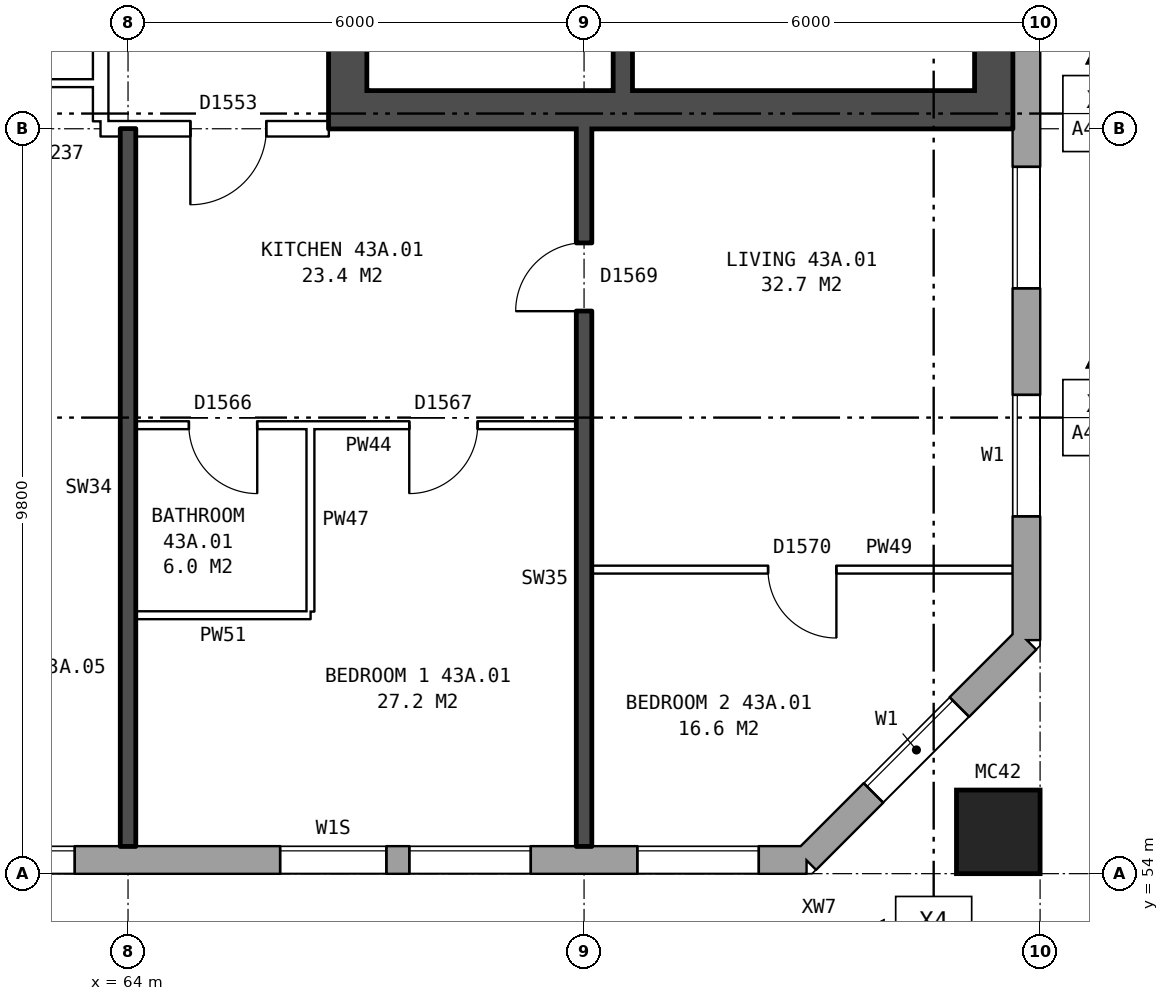
"""IFC4 building model, lengths in metres.
Left out: names, types, materials, properties, quantities, classifications, styles, units other than length and angle.
Written with IfcOpenShell. Run it as: python <this file> out.ifc"""

import sys

from ifc_helpers import new_model, si_unit, direction, frame, frame_2d, origin, origin_2d, place, context, subcontext, project, spatial, rectangle, hollow_rectangle, extrude, element, fill, save


model = new_model("IFC4")
c1 = context("Model", 3, precision=1e-05, world=origin(), true_north=direction((0.0, 1.0)))
c2 = subcontext(c1, "Body", "Model", "MODEL_VIEW")
j1 = project(units=[si_unit("LENGTHUNIT", "METRE"), si_unit("PLANEANGLEUNIT", "RADIAN")], contexts=[c1])
p1 = place(None, origin())
s1 = spatial("IfcSite", under=j1, at=p1, CompositionType="ELEMENT")
p2 = place(p1, origin())
s2 = spatial("IfcBuilding", under=s1, at=p2, CompositionType="ELEMENT")
p3 = place(p2, frame((0.0, 0.0, 154.7)))
s3 = spatial("IfcBuildingStorey", under=s2, at=p3, CompositionType="ELEMENT", Elevation=154.7)
p4 = place(p3, frame((75.45, 54.55, 0.0), z_axis=(0.0, 0.0, 1.0), x_axis=(1.0, 0.0, 0.0)))
e1 = element("IfcColumn", 1, at=p4, inside=s3, PredefinedType="COLUMN", context=c2, shape_type="SweptSolid", body=[
    extrude(hollow_rectangle(XDim=1.1, YDim=1.1, WallThickness=0.06, at=origin_2d()), origin(), (0.0, 0.0, 1.0), 3.1),
])
p5 = place(p3, frame((31.575, 54.18, 0.0), z_axis=(0.0, 0.0, 1.0), x_axis=(1.0, 0.0, 0.0)))
e2 = element("IfcWall", 2, at=p5, inside=s3, PredefinedType="STANDARD", context=c2, shape_type="SweptSolid", body=[
    extrude(rectangle(XDim=41.351, YDim=0.36, at=frame_2d((20.675, 0.0))), origin(), (0.0, 0.0, 1.0), 2.85),
])
p6 = place(p5, frame((3.125, 0.0, 0.8)))
e3 = element("IfcOpeningElement", 3, at=p6, cuts=e2, PredefinedType="OPENING", context=c2, shape_type="SweptSolid", body=[
    extrude(rectangle(XDim=1.6, YDim=1.8, at=frame_2d((0.8, 0.9))), frame((0.0, 0.19, 0.0), z_axis=(0.0, -1.0, 0.0), x_axis=(1.0, 0.0, 0.0)), (0.0, 0.0, 1.0), 0.38),
])
p7 = place(p5, frame((5.025, 0.0, 1.0)))
e4 = element("IfcOpeningElement", 4, at=p7, cuts=e2, PredefinedType="OPENING", context=c2, shape_type="SweptSolid", body=[
    extrude(rectangle(XDim=1.0, YDim=1.5, at=frame_2d((0.5, 0.75))), frame((0.0, 0.19, 0.0), z_axis=(0.0, -1.0, 0.0), x_axis=(1.0, 0.0, 0.0)), (0.0, 0.0, 1.0), 0.38),
])
p8 = place(p5, frame((9.125, 0.0, 0.8)))
e5 = element("IfcOpeningElement", 5, at=p8, cuts=e2, PredefinedType="OPENING", context=c2, shape_type="SweptSolid", body=[
    extrude(rectangle(XDim=1.6, YDim=1.8, at=frame_2d((0.8, 0.9))), frame((0.0, 0.19, 0.0), z_axis=(0.0, -1.0, 0.0), x_axis=(1.0, 0.0, 0.0)), (0.0, 0.0, 1.0), 0.38),
])
p9 = place(p5, frame((12.125, 0.0, 0.8)))
e6 = element("IfcOpeningElement", 6, at=p9, cuts=e2, PredefinedType="OPENING", context=c2, shape_type="SweptSolid", body=[
    extrude(rectangle(XDim=1.6, YDim=1.8, at=frame_2d((0.8, 0.9))), frame((0.0, 0.19, 0.0), z_axis=(0.0, -1.0, 0.0), x_axis=(1.0, 0.0, 0.0)), (0.0, 0.0, 1.0), 0.38),
])
p10 = place(p5, frame((15.125, 0.0, 0.8)))
e7 = element("IfcOpeningElement", 7, at=p10, cuts=e2, PredefinedType="OPENING", context=c2, shape_type="SweptSolid", body=[
    extrude(rectangle(XDim=1.6, YDim=1.8, at=frame_2d((0.8, 0.9))), frame((0.0, 0.19, 0.0), z_axis=(0.0, -1.0, 0.0), x_axis=(1.0, 0.0, 0.0)), (0.0, 0.0, 1.0), 0.38),
])
p11 = place(p5, frame((18.125, 0.0, 0.8)))
e8 = element("IfcOpeningElement", 8, at=p11, cuts=e2, PredefinedType="OPENING", context=c2, shape_type="SweptSolid", body=[
    extrude(rectangle(XDim=1.6, YDim=1.8, at=frame_2d((0.8, 0.9))), frame((0.0, 0.19, 0.0), z_axis=(0.0, -1.0, 0.0), x_axis=(1.0, 0.0, 0.0)), (0.0, 0.0, 1.0), 0.38),
])
p12 = place(p5, frame((21.125, 0.0, 0.8)))
e9 = element("IfcOpeningElement", 9, at=p12, cuts=e2, PredefinedType="OPENING", context=c2, shape_type="SweptSolid", body=[
    extrude(rectangle(XDim=1.6, YDim=1.8, at=frame_2d((0.8, 0.9))), frame((0.0, 0.19, 0.0), z_axis=(0.0, -1.0, 0.0), x_axis=(1.0, 0.0, 0.0)), (0.0, 0.0, 1.0), 0.38),
])
p13 = place(p5, frame((24.125, 0.0, 0.8)))
e10 = element("IfcOpeningElement", 10, at=p13, cuts=e2, PredefinedType="OPENING", context=c2, shape_type="SweptSolid", body=[
    extrude(rectangle(XDim=1.6, YDim=1.8, at=frame_2d((0.8, 0.9))), frame((0.0, 0.19, 0.0), z_axis=(0.0, -1.0, 0.0), x_axis=(1.0, 0.0, 0.0)), (0.0, 0.0, 1.0), 0.38),
])
p14 = place(p5, frame((27.125, 0.0, 0.8)))
e11 = element("IfcOpeningElement", 11, at=p14, cuts=e2, PredefinedType="OPENING", context=c2, shape_type="SweptSolid", body=[
    extrude(rectangle(XDim=1.6, YDim=1.8, at=frame_2d((0.8, 0.9))), frame((0.0, 0.19, 0.0), z_axis=(0.0, -1.0, 0.0), x_axis=(1.0, 0.0, 0.0)), (0.0, 0.0, 1.0), 0.38),
])
p15 = place(p5, frame((30.125, 0.0, 0.8)))
e12 = element("IfcOpeningElement", 12, at=p15, cuts=e2, PredefinedType="OPENING", context=c2, shape_type="SweptSolid", body=[
    extrude(rectangle(XDim=1.6, YDim=1.8, at=frame_2d((0.8, 0.9))), frame((0.0, 0.19, 0.0), z_axis=(0.0, -1.0, 0.0), x_axis=(1.0, 0.0, 0.0)), (0.0, 0.0, 1.0), 0.38),
])
p16 = place(p5, frame((34.425, 0.0, 1.7)))
e13 = element("IfcOpeningElement", 13, at=p16, cuts=e2, PredefinedType="OPENING", context=c2, shape_type="SweptSolid", body=[
    extrude(rectangle(XDim=1.4, YDim=0.9, at=frame_2d((0.7, 0.45))), frame((0.0, 0.19, 0.0), z_axis=(0.0, -1.0, 0.0), x_axis=(1.0, 0.0, 0.0)), (0.0, 0.0, 1.0), 0.38),
])
p17 = place(p5, frame((36.125, 0.0, 0.8)))
e14 = element("IfcOpeningElement", 14, at=p17, cuts=e2, PredefinedType="OPENING", context=c2, shape_type="SweptSolid", body=[
    extrude(rectangle(XDim=1.6, YDim=1.8, at=frame_2d((0.8, 0.9))), frame((0.0, 0.19, 0.0), z_axis=(0.0, -1.0, 0.0), x_axis=(1.0, 0.0, 0.0)), (0.0, 0.0, 1.0), 0.38),
])
p18 = place(p5, frame((39.125, 0.0, 0.8)))
e15 = element("IfcOpeningElement", 15, at=p18, cuts=e2, PredefinedType="OPENING", context=c2, shape_type="SweptSolid", body=[
    extrude(rectangle(XDim=1.6, YDim=1.8, at=frame_2d((0.8, 0.9))), frame((0.0, 0.19, 0.0), z_axis=(0.0, -1.0, 0.0), x_axis=(1.0, 0.0, 0.0)), (0.0, 0.0, 1.0), 0.38),
])
p19 = place(p5, frame((6.325, 0.0, 1.7)))
e16 = element("IfcOpeningElement", 16, at=p19, cuts=e2, PredefinedType="OPENING", context=c2, shape_type="SweptSolid", body=[
    extrude(rectangle(XDim=0.6, YDim=0.9, at=frame_2d((0.3, 0.45))), frame((0.0, 0.19, 0.0), z_axis=(0.0, -1.0, 0.0), x_axis=(1.0, 0.0, 0.0)), (0.0, 0.0, 1.0), 0.38),
])
p20 = place(p3, frame((72.925, 54.18, 0.0), z_axis=(0.0, 0.0, 1.0), x_axis=(0.707106781187, 0.707106781187, 0.0)))
e17 = element("IfcWall", 17, at=p20, inside=s3, PredefinedType="STANDARD", context=c2, shape_type="SweptSolid", body=[
    extrude(rectangle(XDim=4.094, YDim=0.36, at=frame_2d((2.047, 0.0))), origin(), (0.0, 0.0, 1.0), 2.85),
])
p21 = place(p20, frame((1.247, 0.0, 0.8)))
e18 = element("IfcOpeningElement", 18, at=p21, cuts=e17, PredefinedType="OPENING", context=c2, shape_type="SweptSolid", body=[
    extrude(rectangle(XDim=1.6, YDim=1.8, at=frame_2d((0.8, 0.9))), frame((0.0, 0.19, 0.0), z_axis=(0.0, -1.0, 0.0), x_axis=(1.0, 0.0, 0.0)), (0.0, 0.0, 1.0), 0.38),
])
p22 = place(p3, frame((75.82, 57.075, 0.0), z_axis=(0.0, 0.0, 1.0), x_axis=(0.0, 1.0, 0.0)))
e19 = element("IfcWall", 19, at=p22, inside=s3, PredefinedType="STANDARD", context=c2, shape_type="SweptSolid", body=[
    extrude(rectangle(XDim=25.851, YDim=0.36, at=frame_2d((12.925, 0.0))), origin(), (0.0, 0.0, 1.0), 2.85),
])
p23 = place(p22, frame((1.625, 0.0, 0.8)))
e20 = element("IfcOpeningElement", 20, at=p23, cuts=e19, PredefinedType="OPENING", context=c2, shape_type="SweptSolid", body=[
    extrude(rectangle(XDim=1.6, YDim=1.8, at=frame_2d((0.8, 0.9))), frame((0.0, 0.19, 0.0), z_axis=(0.0, -1.0, 0.0), x_axis=(1.0, 0.0, 0.0)), (0.0, 0.0, 1.0), 0.38),
])
p24 = place(p22, frame((4.625, 0.0, 0.8)))
e21 = element("IfcOpeningElement", 21, at=p24, cuts=e19, PredefinedType="OPENING", context=c2, shape_type="SweptSolid", body=[
    extrude(rectangle(XDim=1.6, YDim=1.8, at=frame_2d((0.8, 0.9))), frame((0.0, 0.19, 0.0), z_axis=(0.0, -1.0, 0.0), x_axis=(1.0, 0.0, 0.0)), (0.0, 0.0, 1.0), 0.38),
])
p25 = place(p22, frame((19.625, 0.0, 0.8)))
e22 = element("IfcOpeningElement", 22, at=p25, cuts=e19, PredefinedType="OPENING", context=c2, shape_type="SweptSolid", body=[
    extrude(rectangle(XDim=1.6, YDim=1.8, at=frame_2d((0.8, 0.9))), frame((0.0, 0.19, 0.0), z_axis=(0.0, -1.0, 0.0), x_axis=(1.0, 0.0, 0.0)), (0.0, 0.0, 1.0), 0.38),
])
p26 = place(p22, frame((22.625, 0.0, 0.8)))
e23 = element("IfcOpeningElement", 23, at=p26, cuts=e19, PredefinedType="OPENING", context=c2, shape_type="SweptSolid", body=[
    extrude(rectangle(XDim=1.6, YDim=1.8, at=frame_2d((0.8, 0.9))), frame((0.0, 0.19, 0.0), z_axis=(0.0, -1.0, 0.0), x_axis=(1.0, 0.0, 0.0)), (0.0, 0.0, 1.0), 0.38),
])
p27 = place(p3, frame((66.89, 63.8, 0.0), z_axis=(0.0, 0.0, 1.0), x_axis=(0.0, 1.0, 0.0)))
e24 = element("IfcWall", 24, at=p27, inside=s3, PredefinedType="SHEAR", context=c2, shape_type="SweptSolid", body=[
    extrude(rectangle(XDim=12.4, YDim=0.5, at=frame_2d((6.2, 0.0))), origin(), (0.0, 0.0, 1.0), 2.85),
])
p28 = place(p27, frame((1.325, 0.0, 0.0)))
e25 = element("IfcOpeningElement", 25, at=p28, cuts=e24, PredefinedType="OPENING", context=c2, shape_type="SweptSolid", body=[
    extrude(rectangle(XDim=1.1, YDim=2.1, at=frame_2d((0.55, 1.05))), frame((0.0, 0.26, 0.0), z_axis=(0.0, -1.0, 0.0), x_axis=(1.0, 0.0, 0.0)), (0.0, 0.0, 1.0), 0.52),
])
p29 = place(p27, frame((3.6, 0.0, 0.0)))
e26 = element("IfcOpeningElement", 26, at=p29, cuts=e24, PredefinedType="OPENING", context=c2, shape_type="SweptSolid", body=[
    extrude(rectangle(XDim=1.1, YDim=2.1, at=frame_2d((0.55, 1.05))), frame((0.0, 0.26, 0.0), z_axis=(0.0, -1.0, 0.0), x_axis=(1.0, 0.0, 0.0)), (0.0, 0.0, 1.0), 0.52),
])
p30 = place(p27, frame((5.8, 0.0, 0.0)))
e27 = element("IfcOpeningElement", 27, at=p30, cuts=e24, PredefinedType="OPENING", context=c2, shape_type="SweptSolid", body=[
    extrude(rectangle(XDim=1.1, YDim=2.1, at=frame_2d((0.55, 1.05))), frame((0.0, 0.26, 0.0), z_axis=(0.0, -1.0, 0.0), x_axis=(1.0, 0.0, 0.0)), (0.0, 0.0, 1.0), 0.52),
])
p31 = place(p27, frame((8.0, 0.0, 0.0)))
e28 = element("IfcOpeningElement", 28, at=p31, cuts=e24, PredefinedType="OPENING", context=c2, shape_type="SweptSolid", body=[
    extrude(rectangle(XDim=1.1, YDim=2.1, at=frame_2d((0.55, 1.05))), frame((0.0, 0.26, 0.0), z_axis=(0.0, -1.0, 0.0), x_axis=(1.0, 0.0, 0.0)), (0.0, 0.0, 1.0), 0.52),
])
p32 = place(p27, frame((9.9, 0.0, 0.0)))
e29 = element("IfcOpeningElement", 29, at=p32, cuts=e24, PredefinedType="OPENING", context=c2, shape_type="SweptSolid", body=[
    extrude(rectangle(XDim=1.1, YDim=2.1, at=frame_2d((0.55, 1.05))), frame((0.0, 0.26, 0.0), z_axis=(0.0, -1.0, 0.0), x_axis=(1.0, 0.0, 0.0)), (0.0, 0.0, 1.0), 0.52),
])
p33 = place(p3, frame((75.39, 63.8, 0.0), z_axis=(0.0, 0.0, 1.0), x_axis=(0.0, 1.0, 0.0)))
e30 = element("IfcWall", 30, at=p33, inside=s3, PredefinedType="SHEAR", context=c2, shape_type="SweptSolid", body=[
    extrude(rectangle(XDim=12.4, YDim=0.5, at=frame_2d((6.2, 0.0))), origin(), (0.0, 0.0, 1.0), 2.85),
])
p34 = place(p3, frame((67.14, 64.05, 0.0), z_axis=(0.0, 0.0, 1.0), x_axis=(1.0, 0.0, 0.0)))
e31 = element("IfcWall", 31, at=p34, inside=s3, PredefinedType="SHEAR", context=c2, shape_type="SweptSolid", body=[
    extrude(rectangle(XDim=8.0, YDim=0.5, at=frame_2d((4.0, 0.0))), origin(), (0.0, 0.0, 1.0), 2.85),
])
p35 = place(p3, frame((70.51, 64.3, 0.0), z_axis=(0.0, 0.0, 1.0), x_axis=(0.0, 1.0, 0.0)))
e32 = element("IfcWall", 32, at=p35, inside=s3, PredefinedType="SHEAR", context=c2, shape_type="SweptSolid", body=[
    extrude(rectangle(XDim=2.425, YDim=0.25, at=frame_2d((1.212, 0.0))), origin(), (0.0, 0.0, 1.0), 2.85),
])
p36 = place(p3, frame((63.64, 63.9, 0.0), z_axis=(0.0, 0.0, 1.0), x_axis=(0.0, 1.0, 0.0)))
e33 = element("IfcWall", 33, at=p36, inside=s3, PredefinedType="PARTITIONING", context=c2, shape_type="SweptSolid", body=[
    extrude(rectangle(XDim=12.2, YDim=0.2, at=frame_2d((6.1, 0.0))), origin(), (0.0, 0.0, 1.0), 2.85),
])
p37 = place(p36, frame((5.1, 0.0, 0.0)))
e34 = element("IfcOpeningElement", 34, at=p37, cuts=e33, PredefinedType="OPENING", context=c2, shape_type="SweptSolid", body=[
    extrude(rectangle(XDim=2.0, YDim=2.1, at=frame_2d((1.0, 1.05))), frame((0.0, 0.11, 0.0), z_axis=(0.0, -1.0, 0.0), x_axis=(1.0, 0.0, 0.0)), (0.0, 0.0, 1.0), 0.22),
])
p38 = place(p3, frame((64.1, 57.4, 0.0), z_axis=(0.0, 0.0, 1.0), x_axis=(1.0, 0.0, 0.0)))
e35 = element("IfcWall", 35, at=p38, inside=s3, PredefinedType="PARTITIONING", context=c2, shape_type="SweptSolid", body=[
    extrude(rectangle(XDim=2.3, YDim=0.1, at=frame_2d((1.15, 0.0))), origin(), (0.0, 0.0, 1.0), 2.85),
])
p39 = place(p3, frame((70.1, 58.0, 0.0), z_axis=(0.0, 0.0, 1.0), x_axis=(1.0, 0.0, 0.0)))
e36 = element("IfcWall", 36, at=p39, inside=s3, PredefinedType="PARTITIONING", context=c2, shape_type="SweptSolid", body=[
    extrude(rectangle(XDim=5.54, YDim=0.1, at=frame_2d((2.77, 0.0))), origin(), (0.0, 0.0, 1.0), 2.85),
])
p40 = place(p39, frame((2.32, 0.0, 0.0)))
e37 = element("IfcOpeningElement", 37, at=p40, cuts=e36, PredefinedType="OPENING", context=c2, shape_type="SweptSolid", body=[
    extrude(rectangle(XDim=0.9, YDim=2.1, at=frame_2d((0.45, 1.05))), frame((0.0, 0.06, 0.0), z_axis=(0.0, -1.0, 0.0), x_axis=(1.0, 0.0, 0.0)), (0.0, 0.0, 1.0), 0.12),
])
p41 = place(p3, frame((64.1, 59.9, 0.0), z_axis=(0.0, 0.0, 1.0), x_axis=(1.0, 0.0, 0.0)))
e38 = element("IfcWall", 38, at=p41, inside=s3, PredefinedType="PARTITIONING", context=c2, shape_type="SweptSolid", body=[
    extrude(rectangle(XDim=5.8, YDim=0.1, at=frame_2d((2.9, 0.0))), origin(), (0.0, 0.0, 1.0), 2.85),
])
p42 = place(p41, frame((3.6, 0.0, 0.0)))
e39 = element("IfcOpeningElement", 39, at=p42, cuts=e38, PredefinedType="OPENING", context=c2, shape_type="SweptSolid", body=[
    extrude(rectangle(XDim=0.9, YDim=2.1, at=frame_2d((0.45, 1.05))), frame((0.0, 0.06, 0.0), z_axis=(0.0, -1.0, 0.0), x_axis=(1.0, 0.0, 0.0)), (0.0, 0.0, 1.0), 0.12),
])
p43 = place(p41, frame((0.7, 0.0, 0.0)))
e40 = element("IfcOpeningElement", 40, at=p43, cuts=e38, PredefinedType="OPENING", context=c2, shape_type="SweptSolid", body=[
    extrude(rectangle(XDim=0.9, YDim=2.1, at=frame_2d((0.45, 1.05))), frame((0.0, 0.06, 0.0), z_axis=(0.0, -1.0, 0.0), x_axis=(1.0, 0.0, 0.0)), (0.0, 0.0, 1.0), 0.12),
])
p44 = place(p3, frame((63.64, 63.8, 0.0), z_axis=(0.0, 0.0, 1.0), x_axis=(1.0, 0.0, 0.0)))
e41 = element("IfcWall", 41, at=p44, inside=s3, PredefinedType="PARTITIONING", context=c2, shape_type="SweptSolid", body=[
    extrude(rectangle(XDim=3.0, YDim=0.2, at=frame_2d((1.5, 0.0))), origin(), (0.0, 0.0, 1.0), 2.85),
])
p45 = place(p44, frame((1.18, 0.0, 0.0)))
e42 = element("IfcOpeningElement", 42, at=p45, cuts=e41, PredefinedType="OPENING", context=c2, shape_type="SweptSolid", body=[
    extrude(rectangle(XDim=1.0, YDim=2.1, at=frame_2d((0.5, 1.05))), frame((0.0, 0.11, 0.0), z_axis=(0.0, -1.0, 0.0), x_axis=(1.0, 0.0, 0.0)), (0.0, 0.0, 1.0), 0.22),
])
p46 = place(p3, frame((61.0, 64.4, 0.0), z_axis=(0.0, 0.0, 1.0), x_axis=(1.0, 0.0, 0.0)))
e43 = element("IfcWall", 43, at=p46, inside=s3, PredefinedType="PARTITIONING", context=c2, shape_type="SweptSolid", body=[
    extrude(rectangle(XDim=2.64, YDim=0.1, at=frame_2d((1.32, 0.0))), origin(), (0.0, 0.0, 1.0), 2.85),
])
p47 = place(p3, frame((64.0, 54.36, 0.0), z_axis=(0.0, 0.0, 1.0), x_axis=(0.0, 1.0, 0.0)))
e44 = element("IfcWall", 44, at=p47, inside=s3, PredefinedType="SOLIDWALL", context=c2, shape_type="SweptSolid", body=[
    extrude(rectangle(XDim=9.44, YDim=0.2, at=frame_2d((4.72, 0.0))), origin(), (0.0, 0.0, 1.0), 2.85),
])
p48 = place(p3, frame((66.4, 57.45, 0.0), z_axis=(0.0, 0.0, 1.0), x_axis=(0.0, 1.0, 0.0)))
e45 = element("IfcWall", 45, at=p48, inside=s3, PredefinedType="PARTITIONING", context=c2, shape_type="SweptSolid", body=[
    extrude(rectangle(XDim=2.4, YDim=0.1, at=frame_2d((1.2, 0.0))), origin(), (0.0, 0.0, 1.0), 2.85),
])
p49 = place(p3, frame((70.0, 54.36, 0.0), z_axis=(0.0, 0.0, 1.0), x_axis=(0.0, 1.0, 0.0)))
e46 = element("IfcWall", 46, at=p49, inside=s3, PredefinedType="SOLIDWALL", context=c2, shape_type="SweptSolid", body=[
    extrude(rectangle(XDim=9.44, YDim=0.2, at=frame_2d((4.72, 0.0))), origin(), (0.0, 0.0, 1.0), 2.85),
])
p50 = place(p49, frame((7.04, 0.0, 0.0)))
e47 = element("IfcOpeningElement", 47, at=p50, cuts=e46, PredefinedType="OPENING", context=c2, shape_type="SweptSolid", body=[
    extrude(rectangle(XDim=0.9, YDim=2.1, at=frame_2d((0.45, 1.05))), frame((0.0, 0.11, 0.0), z_axis=(0.0, -1.0, 0.0), x_axis=(1.0, 0.0, 0.0)), (0.0, 0.0, 1.0), 0.22),
])
p51 = place(p15, origin())
e48 = element("IfcWindow", 48, at=p51, inside=s3, PartitioningType="SINGLE_PANEL", PredefinedType="WINDOW", context=c2, shape_type="SweptSolid", body=[
    extrude(rectangle(XDim=1.6, YDim=1.8, at=frame_2d((0.8, 0.9))), frame((0.0, 0.15, 0.0), z_axis=(0.0, -1.0, 0.0), x_axis=(1.0, 0.0, 0.0)), (0.0, 0.0, 1.0), 0.06),
])
fill(e12, e48)
p52 = place(p16, origin())
e49 = element("IfcWindow", 49, at=p52, inside=s3, PartitioningType="SINGLE_PANEL", PredefinedType="WINDOW", context=c2, shape_type="SweptSolid", body=[
    extrude(rectangle(XDim=1.4, YDim=0.9, at=frame_2d((0.7, 0.45))), frame((0.0, 0.15, 0.0), z_axis=(0.0, -1.0, 0.0), x_axis=(1.0, 0.0, 0.0)), (0.0, 0.0, 1.0), 0.06),
])
fill(e13, e49)
p53 = place(p17, origin())
e50 = element("IfcWindow", 50, at=p53, inside=s3, PartitioningType="SINGLE_PANEL", PredefinedType="WINDOW", context=c2, shape_type="SweptSolid", body=[
    extrude(rectangle(XDim=1.6, YDim=1.8, at=frame_2d((0.8, 0.9))), frame((0.0, 0.15, 0.0), z_axis=(0.0, -1.0, 0.0), x_axis=(1.0, 0.0, 0.0)), (0.0, 0.0, 1.0), 0.06),
])
fill(e14, e50)
p54 = place(p18, origin())
e51 = element("IfcWindow", 51, at=p54, inside=s3, PartitioningType="SINGLE_PANEL", PredefinedType="WINDOW", context=c2, shape_type="SweptSolid", body=[
    extrude(rectangle(XDim=1.6, YDim=1.8, at=frame_2d((0.8, 0.9))), frame((0.0, 0.15, 0.0), z_axis=(0.0, -1.0, 0.0), x_axis=(1.0, 0.0, 0.0)), (0.0, 0.0, 1.0), 0.06),
])
fill(e15, e51)
p55 = place(p21, origin())
e52 = element("IfcWindow", 52, at=p55, inside=s3, PartitioningType="SINGLE_PANEL", PredefinedType="WINDOW", context=c2, shape_type="SweptSolid", body=[
    extrude(rectangle(XDim=1.6, YDim=1.8, at=frame_2d((0.8, 0.9))), frame((0.0, 0.15, 0.0), z_axis=(0.0, -1.0, 0.0), x_axis=(1.0, 0.0, 0.0)), (0.0, 0.0, 1.0), 0.06),
])
fill(e18, e52)
p56 = place(p23, origin())
e53 = element("IfcWindow", 53, at=p56, inside=s3, PartitioningType="SINGLE_PANEL", PredefinedType="WINDOW", context=c2, shape_type="SweptSolid", body=[
    extrude(rectangle(XDim=1.6, YDim=1.8, at=frame_2d((0.8, 0.9))), frame((0.0, 0.15, 0.0), z_axis=(0.0, -1.0, 0.0), x_axis=(1.0, 0.0, 0.0)), (0.0, 0.0, 1.0), 0.06),
])
fill(e20, e53)
p57 = place(p24, origin())
e54 = element("IfcWindow", 54, at=p57, inside=s3, PartitioningType="SINGLE_PANEL", PredefinedType="WINDOW", context=c2, shape_type="SweptSolid", body=[
    extrude(rectangle(XDim=1.6, YDim=1.8, at=frame_2d((0.8, 0.9))), frame((0.0, 0.15, 0.0), z_axis=(0.0, -1.0, 0.0), x_axis=(1.0, 0.0, 0.0)), (0.0, 0.0, 1.0), 0.06),
])
fill(e21, e54)
p58 = place(p42, frame((0.9, 0.0, 0.0), z_axis=(0.0, 0.0, 1.0), x_axis=(-1.0, 0.0, 0.0)))
e55 = element("IfcDoor", 55, at=p58, inside=s3, OperationType="SINGLE_SWING_RIGHT", PredefinedType="DOOR", context=c2, shape_type="SweptSolid", body=[
    extrude(rectangle(XDim=0.9, YDim=2.1, at=frame_2d((0.45, 1.05))), frame((0.0, 0.025, 0.0), z_axis=(0.0, -1.0, 0.0), x_axis=(1.0, 0.0, 0.0)), (0.0, 0.0, 1.0), 0.05),
])
fill(e39, e55)
p59 = place(p40, frame((0.9, 0.0, 0.0), z_axis=(0.0, 0.0, 1.0), x_axis=(-1.0, 0.0, 0.0)))
e56 = element("IfcDoor", 56, at=p59, inside=s3, OperationType="SINGLE_SWING_LEFT", PredefinedType="DOOR", context=c2, shape_type="SweptSolid", body=[
    extrude(rectangle(XDim=0.9, YDim=2.1, at=frame_2d((0.45, 1.05))), frame((0.0, 0.025, 0.0), z_axis=(0.0, -1.0, 0.0), x_axis=(1.0, 0.0, 0.0)), (0.0, 0.0, 1.0), 0.05),
])
fill(e37, e56)
p60 = place(p45, frame((1.0, 0.0, 0.0), z_axis=(0.0, 0.0, 1.0), x_axis=(-1.0, 0.0, 0.0)))
e57 = element("IfcDoor", 57, at=p60, inside=s3, OperationType="SINGLE_SWING_RIGHT", PredefinedType="DOOR", context=c2, shape_type="SweptSolid", body=[
    extrude(rectangle(XDim=1.0, YDim=2.1, at=frame_2d((0.5, 1.05))), frame((0.0, 0.025, 0.0), z_axis=(0.0, -1.0, 0.0), x_axis=(1.0, 0.0, 0.0)), (0.0, 0.0, 1.0), 0.05),
])
fill(e42, e57)
p61 = place(p50, origin())
e58 = element("IfcDoor", 58, at=p61, inside=s3, OperationType="SINGLE_SWING_LEFT", PredefinedType="DOOR", context=c2, shape_type="SweptSolid", body=[
    extrude(rectangle(XDim=0.9, YDim=2.1, at=frame_2d((0.45, 1.05))), frame((0.0, 0.025, 0.0), z_axis=(0.0, -1.0, 0.0), x_axis=(1.0, 0.0, 0.0)), (0.0, 0.0, 1.0), 0.05),
])
fill(e47, e58)
p62 = place(p43, frame((0.9, 0.0, 0.0), z_axis=(0.0, 0.0, 1.0), x_axis=(-1.0, 0.0, 0.0)))
e59 = element("IfcDoor", 59, at=p62, inside=s3, OperationType="SINGLE_SWING_LEFT", PredefinedType="DOOR", context=c2, shape_type="SweptSolid", body=[
    extrude(rectangle(XDim=0.9, YDim=2.1, at=frame_2d((0.45, 1.05))), frame((0.0, 0.025, 0.0), z_axis=(0.0, -1.0, 0.0), x_axis=(1.0, 0.0, 0.0)), (0.0, 0.0, 1.0), 0.05),
])
fill(e40, e59)
save(model, sys.argv[1])
